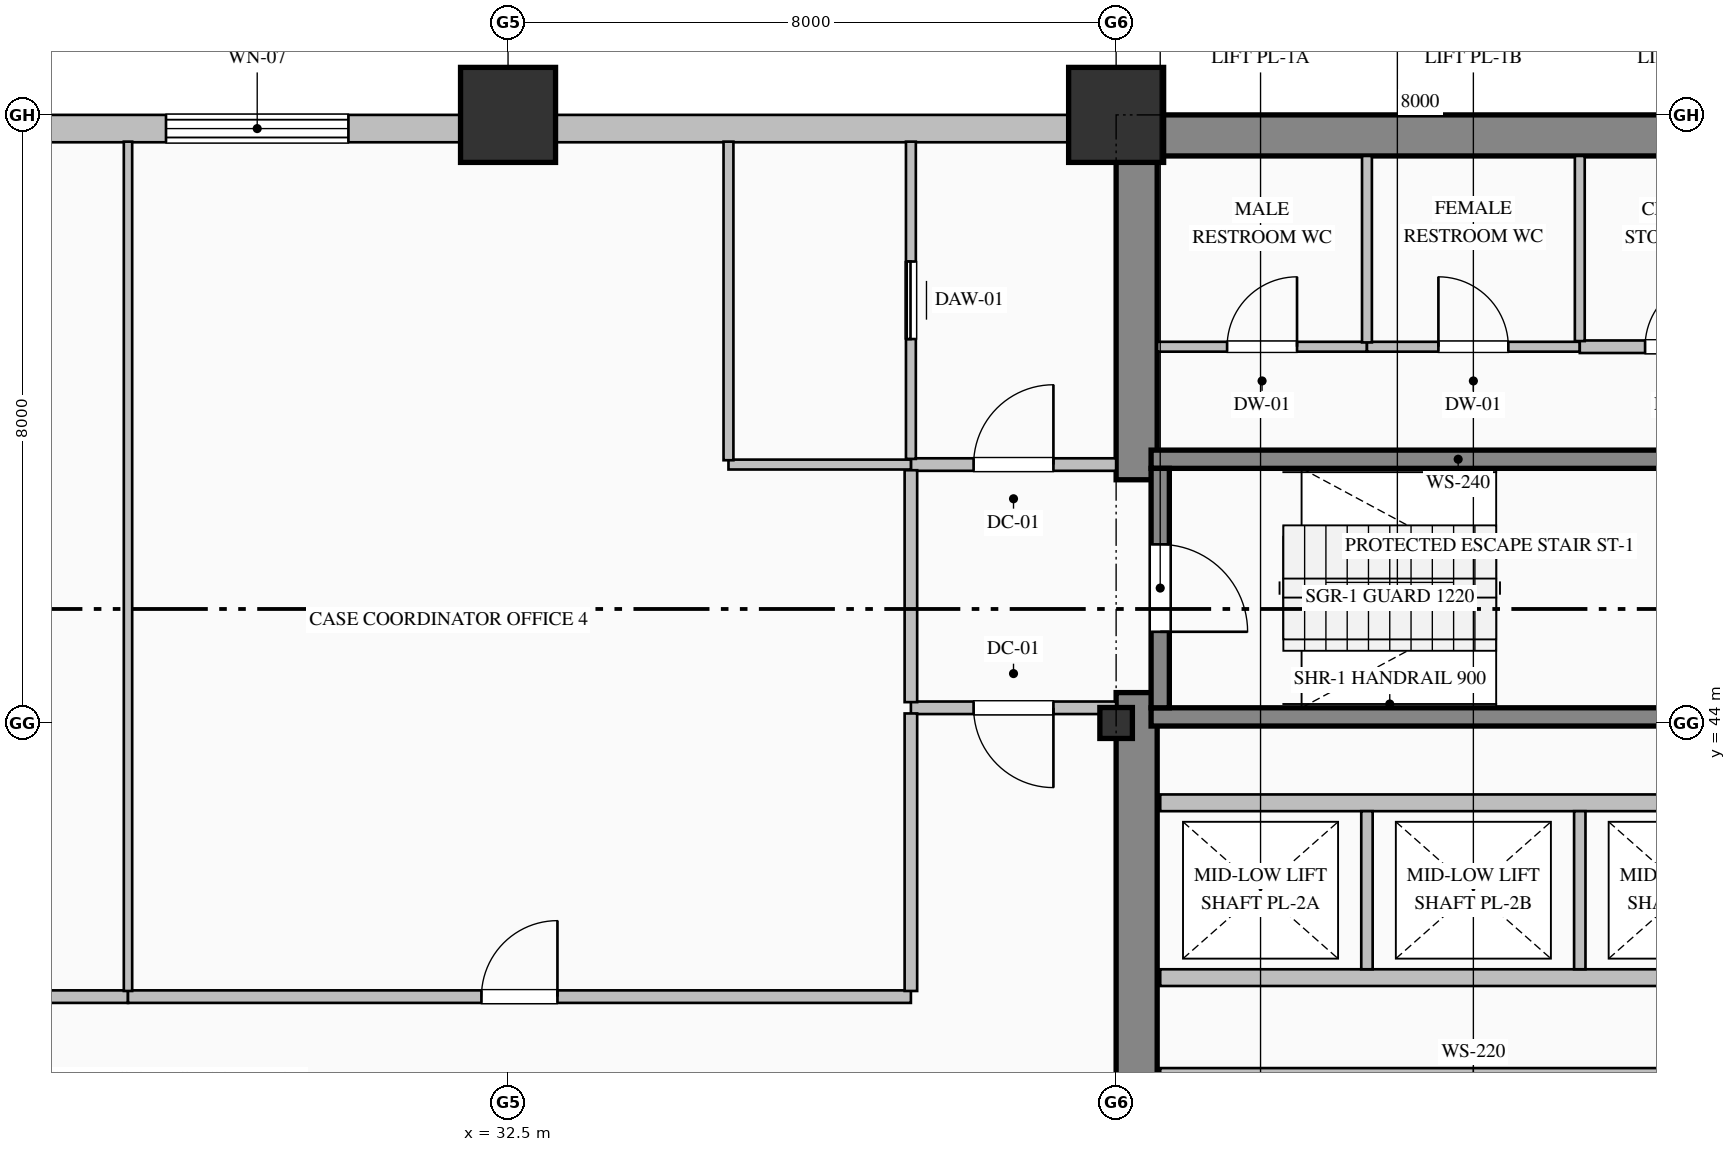
"""IFC4 building model, lengths in metres.
Left out: names, types, materials, properties, quantities, classifications, styles, units other than length and angle.
Written with IfcOpenShell. Run it as: python <this file> out.ifc"""

import sys

from ifc_helpers import new_model, si_unit, direction, frame, frame_2d, origin, origin_2d, place, context, subcontext, project, spatial, rectangle, hollow_rectangle, i_section, extrude, element, fill, save


model = new_model("IFC4")
c1 = context("Model", 3, precision=1e-05, world=origin(), true_north=direction((0.0, 1.0)))
c2 = subcontext(c1, "Body", "Model", "MODEL_VIEW")
j1 = project(units=[si_unit("LENGTHUNIT", "METRE"), si_unit("PLANEANGLEUNIT", "RADIAN")], contexts=[c1])
p1 = place(None, origin())
s1 = spatial("IfcSite", under=j1, at=p1, CompositionType="ELEMENT")
p2 = place(p1, origin())
s2 = spatial("IfcBuilding", under=s1, at=p2, CompositionType="ELEMENT")
p3 = place(p2, frame((0.0, 0.0, 88.2)))
s3 = spatial("IfcBuildingStorey", under=s2, at=p3, CompositionType="ELEMENT", Elevation=88.2)
p4 = place(p3, frame((40.5, 51.73, 0.0), z_axis=(0.0, 0.0, 1.0), x_axis=(1.0, 0.0, 0.0)))
e1 = element("IfcWall", 1, at=p4, inside=s3, PredefinedType="SHEAR", context=c2, shape_type="SweptSolid", body=[
    extrude(rectangle(XDim=23.5, YDim=0.54, at=frame_2d((11.75, 0.0))), origin(), (0.0, 0.0, 1.0), 3.75),
])
p5 = place(p3, frame((40.77, 36.54, 0.0), z_axis=(0.0, 0.0, 1.0), x_axis=(0.0, 1.0, 0.0)))
e2 = element("IfcWall", 2, at=p5, inside=s3, PredefinedType="SHEAR", context=c2, shape_type="SweptSolid", body=[
    extrude(rectangle(XDim=7.86, YDim=0.54, at=frame_2d((3.93, 0.0))), origin(), (0.0, 0.0, 1.0), 3.75),
])
p6 = place(p3, frame((40.77, 47.2, 0.0), z_axis=(0.0, 0.0, 1.0), x_axis=(0.0, 1.0, 0.0)))
e3 = element("IfcWall", 3, at=p6, inside=s3, PredefinedType="SHEAR", context=c2, shape_type="SweptSolid", body=[
    extrude(rectangle(XDim=4.26, YDim=0.54, at=frame_2d((2.13, 0.0))), origin(), (0.0, 0.0, 1.0), 3.75),
])
p7 = place(p3, frame((32.5, 52.0, 0.0), z_axis=(0.0, 0.0, 1.0), x_axis=(1.0, 0.0, 0.0)))
e4 = element("IfcColumn", 4, at=p7, inside=s3, PredefinedType="COLUMN", context=c2, shape_type="SweptSolid", body=[
    extrude(hollow_rectangle(XDim=1.25, YDim=1.25, WallThickness=0.045, at=origin_2d()), origin(), (0.0, 0.0, 1.0), 4.0),
])
p8 = place(p3, frame((40.5, 44.0, 0.0), z_axis=(0.0, 0.0, 1.0), x_axis=(1.0, 0.0, 0.0)))
e5 = element("IfcColumn", 5, at=p8, inside=s3, PredefinedType="COLUMN", context=c2, shape_type="SweptSolid", body=[
    extrude(i_section(OverallWidth=0.407, OverallDepth=0.428, WebThickness=0.02, FlangeThickness=0.035, FilletRadius=0.022, at=origin_2d()), origin(), (0.0, 0.0, 1.0), 4.0),
])
p9 = place(p3, frame((40.5, 52.0, 0.0), z_axis=(0.0, 0.0, 1.0), x_axis=(1.0, 0.0, 0.0)))
e6 = element("IfcColumn", 6, at=p9, inside=s3, PredefinedType="COLUMN", context=c2, shape_type="SweptSolid", body=[
    extrude(hollow_rectangle(XDim=1.25, YDim=1.25, WallThickness=0.045, at=origin_2d()), origin(), (0.0, 0.0, 1.0), 4.0),
])
p10 = place(p3, frame((4.0, 51.82, 0.0), z_axis=(0.0, 0.0, 1.0), x_axis=(1.0, 0.0, 0.0)))
e7 = element("IfcWall", 7, at=p10, inside=s3, PredefinedType="SOLIDWALL", context=c2, shape_type="SweptSolid", body=[
    extrude(rectangle(XDim=36.52, YDim=0.36, at=frame_2d((18.26, 0.0))), origin(), (0.0, 0.0, 1.0), 3.25),
])
p11 = place(p10, frame((6.3, 0.0, 0.85)))
e8 = element("IfcOpeningElement", 8, at=p11, cuts=e7, PredefinedType="OPENING", context=c2, shape_type="SweptSolid", body=[
    extrude(rectangle(XDim=1.8, YDim=2.05, at=frame_2d((0.9, 1.025))), frame((0.0, 0.19, 0.0), z_axis=(0.0, -1.0, 0.0), x_axis=(1.0, 0.0, 0.0)), (0.0, 0.0, 1.0), 0.38),
])
p12 = place(p10, frame((17.1, 0.0, 0.85)))
e9 = element("IfcOpeningElement", 9, at=p12, cuts=e7, PredefinedType="OPENING", context=c2, shape_type="SweptSolid", body=[
    extrude(rectangle(XDim=1.8, YDim=2.05, at=frame_2d((0.9, 1.025))), frame((0.0, 0.19, 0.0), z_axis=(0.0, -1.0, 0.0), x_axis=(1.0, 0.0, 0.0)), (0.0, 0.0, 1.0), 0.38),
])
p13 = place(p10, frame((24.0, 0.0, 0.8)))
e10 = element("IfcOpeningElement", 10, at=p13, cuts=e7, PredefinedType="OPENING", context=c2, shape_type="SweptSolid", body=[
    extrude(rectangle(XDim=2.4, YDim=2.15, at=frame_2d((1.2, 1.075))), frame((0.0, 0.19, 0.0), z_axis=(0.0, -1.0, 0.0), x_axis=(1.0, 0.0, 0.0)), (0.0, 0.0, 1.0), 0.38),
])
for number, where, z_axis, x_axis in (
    (11, (40.96, 47.47, 0.0), (0.0, 0.0, 1.0), (1.0, 0.0, 0.0)),
    (12, (49.04, 44.08, 0.0), (0.0, 0.0, 1.0), (-1.0, 0.0, 0.0)),
):
    element("IfcWall", number, at=place(p3, frame(where, z_axis=z_axis, x_axis=x_axis)), inside=s3, PredefinedType="SOLIDWALL", context=c2, shape_type="SweptSolid", body=[
        extrude(rectangle(XDim=8.08, YDim=0.24, at=frame_2d((4.04, 0.0))), origin(), (0.0, 0.0, 1.0), 4.0),
    ])
p14 = place(p3, frame((41.08, 47.35, 0.0), z_axis=(0.0, 0.0, 1.0), x_axis=(0.0, -1.0, 0.0)))
e13 = element("IfcWall", 13, at=p14, inside=s3, PredefinedType="SOLIDWALL", context=c2, shape_type="SweptSolid", body=[
    extrude(rectangle(XDim=3.15, YDim=0.24, at=frame_2d((1.575, 0.0))), origin(), (0.0, 0.0, 1.0), 4.0),
])
p15 = place(p14, frame((1.0, 0.0, 0.0)))
e14 = element("IfcOpeningElement", 14, at=p15, cuts=e13, PredefinedType="OPENING", context=c2, shape_type="SweptSolid", body=[
    extrude(rectangle(XDim=1.15, YDim=2.2, at=frame_2d((0.575, 1.1))), frame((0.0, 0.13, 0.0), z_axis=(0.0, -1.0, 0.0), x_axis=(1.0, 0.0, 0.0)), (0.0, 0.0, 1.0), 0.26),
])
for number, where, z_axis, x_axis in (
    (15, (41.08, 39.35, 0.0), (0.0, 0.0, 1.0), (1.0, 0.0, 0.0)),
    (16, (49.32, 40.65, 0.0), (0.0, 0.0, 1.0), (-1.0, 0.0, 0.0)),
    (17, (41.08, 42.95, 0.0), (0.0, 0.0, 1.0), (1.0, 0.0, 0.0)),
):
    element("IfcWall", number, at=place(p3, frame(where, z_axis=z_axis, x_axis=x_axis)), inside=s3, PredefinedType="PARTITIONING", context=c2, shape_type="SweptSolid", body=[
        extrude(rectangle(XDim=8.24, YDim=0.22, at=frame_2d((4.12, 0.0))), origin(), (0.0, 0.0, 1.0), 3.75),
    ])
for number, where, z_axis, x_axis in (
    (18, (43.8, 40.76, 0.0), (0.0, 0.0, 1.0), (0.0, 1.0, 0.0)),
    (19, (46.6, 40.76, 0.0), (0.0, 0.0, 1.0), (0.0, 1.0, 0.0)),
):
    element("IfcWall", number, at=place(p3, frame(where, z_axis=z_axis, x_axis=x_axis)), inside=s3, PredefinedType="PARTITIONING", context=c2, shape_type="SweptSolid", body=[
        extrude(rectangle(XDim=2.08, YDim=0.15, at=frame_2d((1.04, 0.0))), origin(), (0.0, 0.0, 1.0), 3.75),
    ])
p16 = place(p3, frame((37.8, 47.4, 0.0), z_axis=(0.0, 0.0, 1.0), x_axis=(1.0, 0.0, 0.0)))
e20 = element("IfcWall", 20, at=p16, inside=s3, PredefinedType="PARTITIONING", context=c2, shape_type="SweptSolid", body=[
    extrude(rectangle(XDim=2.7, YDim=0.165, at=frame_2d((1.35, 0.0))), origin(), (0.0, 0.0, 1.0), 3.75),
])
p17 = place(p16, frame((0.825, 0.0, 0.0)))
e21 = element("IfcOpeningElement", 21, at=p17, cuts=e20, PredefinedType="OPENING", context=c2, shape_type="SweptSolid", body=[
    extrude(rectangle(XDim=1.05, YDim=2.15, at=frame_2d((0.525, 1.075))), frame((0.0, 0.093, 0.0), z_axis=(0.0, -1.0, 0.0), x_axis=(1.0, 0.0, 0.0)), (0.0, 0.0, 1.0), 0.185),
])
p18 = place(p3, frame((40.5, 44.2, 0.0), z_axis=(0.0, 0.0, 1.0), x_axis=(-1.0, 0.0, 0.0)))
e22 = element("IfcWall", 22, at=p18, inside=s3, PredefinedType="PARTITIONING", context=c2, shape_type="SweptSolid", body=[
    extrude(rectangle(XDim=2.7, YDim=0.165, at=frame_2d((1.35, 0.0))), origin(), (0.0, 0.0, 1.0), 3.75),
])
p19 = place(p18, frame((0.825, 0.0, 0.0)))
e23 = element("IfcOpeningElement", 23, at=p19, cuts=e22, PredefinedType="OPENING", context=c2, shape_type="SweptSolid", body=[
    extrude(rectangle(XDim=1.05, YDim=2.15, at=frame_2d((0.525, 1.075))), frame((0.0, 0.093, 0.0), z_axis=(0.0, -1.0, 0.0), x_axis=(1.0, 0.0, 0.0)), (0.0, 0.0, 1.0), 0.185),
])
p20 = place(p3, frame((37.8, 44.274, 0.0), z_axis=(0.0, 0.0, 1.0), x_axis=(0.0, 1.0, 0.0)))
e24 = element("IfcWall", 24, at=p20, inside=s3, PredefinedType="PARTITIONING", context=c2, shape_type="SweptSolid", body=[
    extrude(rectangle(XDim=3.051, YDim=0.165, at=frame_2d((1.525, 0.0))), origin(), (0.0, 0.0, 1.0), 3.75),
])
p21 = place(p3, frame((37.8, 47.475, 0.0), z_axis=(0.0, 0.0, 1.0), x_axis=(0.0, 1.0, 0.0)))
e25 = element("IfcWall", 25, at=p21, inside=s3, PredefinedType="PARTITIONING", context=c2, shape_type="SweptSolid", body=[
    extrude(rectangle(XDim=4.173, YDim=0.13, at=frame_2d((2.087, 0.0))), origin(), (0.0, 0.0, 1.0), 3.75),
])
p22 = place(p21, frame((1.577, 0.0, 0.0)))
e26 = element("IfcOpeningElement", 26, at=p22, cuts=e25, PredefinedType="OPENING", context=c2, shape_type="SweptSolid", body=[
    extrude(rectangle(XDim=1.02, YDim=2.15, at=frame_2d((0.51, 1.075))), frame((0.0, 0.075, 0.0), z_axis=(0.0, -1.0, 0.0), x_axis=(1.0, 0.0, 0.0)), (0.0, 0.0, 1.0), 0.15),
])
p23 = place(p3, frame((37.8, 47.4, 0.0), z_axis=(0.0, 0.0, 1.0), x_axis=(-1.0, 0.0, 0.0)))
e27 = element("IfcWall", 27, at=p23, inside=s3, PredefinedType="PARTITIONING", context=c2, shape_type="SweptSolid", body=[
    extrude(rectangle(XDim=2.4, YDim=0.13, at=frame_2d((1.2, 0.0))), origin(), (0.0, 0.0, 1.0), 3.75),
])
p24 = place(p3, frame((35.4, 47.457, 0.0), z_axis=(0.0, 0.0, 1.0), x_axis=(0.0, 1.0, 0.0)))
e28 = element("IfcWall", 28, at=p24, inside=s3, PredefinedType="PARTITIONING", context=c2, shape_type="SweptSolid", body=[
    extrude(rectangle(XDim=4.191, YDim=0.13, at=frame_2d((2.095, 0.0))), origin(), (0.0, 0.0, 1.0), 3.75),
])
p25 = place(p3, frame((41.04, 48.95, 0.0), z_axis=(0.0, 0.0, 1.0), x_axis=(1.0, 0.0, 0.0)))
e29 = element("IfcWall", 29, at=p25, inside=s3, PredefinedType="PARTITIONING", context=c2, shape_type="SweptSolid", body=[
    extrude(rectangle(XDim=2.76, YDim=0.13, at=frame_2d((1.38, 0.0))), origin(), (0.0, 0.0, 1.0), 3.75),
])
p26 = place(p25, frame((0.92, 0.0, 0.0)))
e30 = element("IfcOpeningElement", 30, at=p26, cuts=e29, PredefinedType="OPENING", context=c2, shape_type="SweptSolid", body=[
    extrude(rectangle(XDim=0.92, YDim=2.15, at=frame_2d((0.46, 1.075))), frame((0.0, 0.075, 0.0), z_axis=(0.0, -1.0, 0.0), x_axis=(1.0, 0.0, 0.0)), (0.0, 0.0, 1.0), 0.15),
])
p27 = place(p3, frame((43.8, 48.95, 0.0), z_axis=(0.0, 0.0, 1.0), x_axis=(1.0, 0.0, 0.0)))
e31 = element("IfcWall", 31, at=p27, inside=s3, PredefinedType="PARTITIONING", context=c2, shape_type="SweptSolid", body=[
    extrude(rectangle(XDim=2.8, YDim=0.13, at=frame_2d((1.4, 0.0))), origin(), (0.0, 0.0, 1.0), 3.75),
])
p28 = place(p27, frame((0.94, 0.0, 0.0)))
e32 = element("IfcOpeningElement", 32, at=p28, cuts=e31, PredefinedType="OPENING", context=c2, shape_type="SweptSolid", body=[
    extrude(rectangle(XDim=0.92, YDim=2.15, at=frame_2d((0.46, 1.075))), frame((0.0, 0.075, 0.0), z_axis=(0.0, -1.0, 0.0), x_axis=(1.0, 0.0, 0.0)), (0.0, 0.0, 1.0), 0.15),
])
p29 = place(p3, frame((46.6, 48.95, 0.0), z_axis=(0.0, 0.0, 1.0), x_axis=(1.0, 0.0, 0.0)))
e33 = element("IfcWall", 33, at=p29, inside=s3, PredefinedType="PARTITIONING", context=c2, shape_type="SweptSolid", body=[
    extrude(rectangle(XDim=2.618, YDim=0.165, at=frame_2d((1.309, 0.0))), origin(), (0.0, 0.0, 1.0), 3.75),
])
p30 = place(p29, frame((0.859, 0.0, 0.0)))
e34 = element("IfcOpeningElement", 34, at=p30, cuts=e33, PredefinedType="OPENING", context=c2, shape_type="SweptSolid", body=[
    extrude(rectangle(XDim=0.9, YDim=2.15, at=frame_2d((0.45, 1.075))), frame((0.0, 0.093, 0.0), z_axis=(0.0, -1.0, 0.0), x_axis=(1.0, 0.0, 0.0)), (0.0, 0.0, 1.0), 0.185),
])
p31 = place(p3, frame((43.8, 51.46, 0.0), z_axis=(0.0, 0.0, 1.0), x_axis=(0.0, -1.0, 0.0)))
e35 = element("IfcWall", 35, at=p31, inside=s3, PredefinedType="PARTITIONING", context=c2, shape_type="SweptSolid", body=[
    extrude(rectangle(XDim=2.453, YDim=0.13, at=frame_2d((1.227, 0.0))), origin(), (0.0, 0.0, 1.0), 3.75),
])
p32 = place(p3, frame((46.6, 51.46, 0.0), z_axis=(0.0, 0.0, 1.0), x_axis=(0.0, -1.0, 0.0)))
e36 = element("IfcWall", 36, at=p32, inside=s3, PredefinedType="PARTITIONING", context=c2, shape_type="SweptSolid", body=[
    extrude(rectangle(XDim=2.436, YDim=0.13, at=frame_2d((1.218, 0.0))), origin(), (0.0, 0.0, 1.0), 3.75),
])
p33 = place(p3, frame((20.5, 40.4, 0.0), z_axis=(0.0, 0.0, 1.0), x_axis=(1.0, 0.0, 0.0)))
e37 = element("IfcWall", 37, at=p33, inside=s3, PredefinedType="PARTITIONING", context=c2, shape_type="SweptSolid", body=[
    extrude(rectangle(XDim=7.0, YDim=0.165, at=frame_2d((3.5, 0.0))), origin(), (0.0, 0.0, 1.0), 3.75),
])
p34 = place(p33, frame((3.0, 0.0, 0.0)))
e38 = element("IfcOpeningElement", 38, at=p34, cuts=e37, PredefinedType="OPENING", context=c2, shape_type="SweptSolid", body=[
    extrude(rectangle(XDim=1.0, YDim=2.15, at=frame_2d((0.5, 1.075))), frame((0.0, 0.093, 0.0), z_axis=(0.0, -1.0, 0.0), x_axis=(1.0, 0.0, 0.0)), (0.0, 0.0, 1.0), 0.185),
])
p35 = place(p3, frame((27.5, 40.4, 0.0), z_axis=(0.0, 0.0, 1.0), x_axis=(1.0, 0.0, 0.0)))
e39 = element("IfcWall", 39, at=p35, inside=s3, PredefinedType="PARTITIONING", context=c2, shape_type="SweptSolid", body=[
    extrude(rectangle(XDim=10.3, YDim=0.165, at=frame_2d((5.15, 0.0))), origin(), (0.0, 0.0, 1.0), 3.75),
])
p36 = place(p35, frame((4.65, 0.0, 0.0)))
e40 = element("IfcOpeningElement", 40, at=p36, cuts=e39, PredefinedType="OPENING", context=c2, shape_type="SweptSolid", body=[
    extrude(rectangle(XDim=1.0, YDim=2.15, at=frame_2d((0.5, 1.075))), frame((0.0, 0.093, 0.0), z_axis=(0.0, -1.0, 0.0), x_axis=(1.0, 0.0, 0.0)), (0.0, 0.0, 1.0), 0.185),
])
p37 = place(p3, frame((37.8, 40.475, 0.0), z_axis=(0.0, 0.0, 1.0), x_axis=(0.0, 1.0, 0.0)))
e41 = element("IfcWall", 41, at=p37, inside=s3, PredefinedType="PARTITIONING", context=c2, shape_type="SweptSolid", body=[
    extrude(rectangle(XDim=3.651, YDim=0.165, at=frame_2d((1.825, 0.0))), origin(), (0.0, 0.0, 1.0), 3.75),
])
p38 = place(p3, frame((27.5, 51.648, 0.0), z_axis=(0.0, 0.0, 1.0), x_axis=(0.0, -1.0, 0.0)))
e42 = element("IfcWall", 42, at=p38, inside=s3, PredefinedType="MOVABLE", context=c2, shape_type="SweptSolid", body=[
    extrude(rectangle(XDim=11.173, YDim=0.11, at=frame_2d((5.587, 0.0))), origin(), (0.0, 0.0, 1.0), 3.75),
])
p39 = place(p13, origin())
e43 = element("IfcWindow", 43, at=p39, inside=s3, PartitioningType="TRIPLE_PANEL_VERTICAL", PredefinedType="WINDOW", context=c2, shape_type="SweptSolid", body=[
    extrude(rectangle(XDim=2.4, YDim=2.15, at=frame_2d((1.2, 1.075))), frame((0.0, 0.15, 0.0), z_axis=(0.0, -1.0, 0.0), x_axis=(1.0, 0.0, 0.0)), (0.0, 0.0, 1.0), 0.06),
])
fill(e10, e43)
p40 = place(p15, origin())
e44 = element("IfcDoor", 44, at=p40, inside=s3, OperationType="SINGLE_SWING_RIGHT", PredefinedType="DOOR", context=c2, shape_type="SweptSolid", body=[
    extrude(rectangle(XDim=1.15, YDim=2.2, at=frame_2d((0.575, 1.1))), frame((0.0, 0.025, 0.0), z_axis=(0.0, -1.0, 0.0), x_axis=(1.0, 0.0, 0.0)), (0.0, 0.0, 1.0), 0.05),
])
fill(e14, e44)
p41 = place(p17, origin())
e45 = element("IfcDoor", 45, at=p41, inside=s3, OperationType="SINGLE_SWING_RIGHT", PredefinedType="DOOR", context=c2, shape_type="SweptSolid", body=[
    extrude(rectangle(XDim=1.05, YDim=2.15, at=frame_2d((0.525, 1.075))), frame((0.0, 0.025, 0.0), z_axis=(0.0, -1.0, 0.0), x_axis=(1.0, 0.0, 0.0)), (0.0, 0.0, 1.0), 0.05),
])
fill(e21, e45)
p42 = place(p19, origin())
e46 = element("IfcDoor", 46, at=p42, inside=s3, OperationType="SINGLE_SWING_LEFT", PredefinedType="DOOR", context=c2, shape_type="SweptSolid", body=[
    extrude(rectangle(XDim=1.05, YDim=2.15, at=frame_2d((0.525, 1.075))), frame((0.0, 0.025, 0.0), z_axis=(0.0, -1.0, 0.0), x_axis=(1.0, 0.0, 0.0)), (0.0, 0.0, 1.0), 0.05),
])
fill(e23, e46)
p43 = place(p22, origin())
e47 = element("IfcDoor", 47, at=p43, inside=s3, OperationType="SLIDING_TO_LEFT", PredefinedType="DOOR", context=c2, shape_type="SweptSolid", body=[
    extrude(rectangle(XDim=1.02, YDim=2.15, at=frame_2d((0.51, 1.075))), frame((0.0, 0.025, 0.0), z_axis=(0.0, -1.0, 0.0), x_axis=(1.0, 0.0, 0.0)), (0.0, 0.0, 1.0), 0.05),
])
fill(e26, e47)
p44 = place(p26, origin())
e48 = element("IfcDoor", 48, at=p44, inside=s3, OperationType="SINGLE_SWING_RIGHT", PredefinedType="DOOR", context=c2, shape_type="SweptSolid", body=[
    extrude(rectangle(XDim=0.92, YDim=2.15, at=frame_2d((0.46, 1.075))), frame((0.0, 0.025, 0.0), z_axis=(0.0, -1.0, 0.0), x_axis=(1.0, 0.0, 0.0)), (0.0, 0.0, 1.0), 0.05),
])
fill(e30, e48)
p45 = place(p28, origin())
e49 = element("IfcDoor", 49, at=p45, inside=s3, OperationType="SINGLE_SWING_LEFT", PredefinedType="DOOR", context=c2, shape_type="SweptSolid", body=[
    extrude(rectangle(XDim=0.92, YDim=2.15, at=frame_2d((0.46, 1.075))), frame((0.0, 0.025, 0.0), z_axis=(0.0, -1.0, 0.0), x_axis=(1.0, 0.0, 0.0)), (0.0, 0.0, 1.0), 0.05),
])
fill(e32, e49)
p46 = place(p30, origin())
e50 = element("IfcDoor", 50, at=p46, inside=s3, OperationType="SINGLE_SWING_RIGHT", PredefinedType="DOOR", context=c2, shape_type="SweptSolid", body=[
    extrude(rectangle(XDim=0.9, YDim=2.15, at=frame_2d((0.45, 1.075))), frame((0.0, 0.025, 0.0), z_axis=(0.0, -1.0, 0.0), x_axis=(1.0, 0.0, 0.0)), (0.0, 0.0, 1.0), 0.05),
])
fill(e34, e50)
p47 = place(p36, origin())
e51 = element("IfcDoor", 51, at=p47, inside=s3, OperationType="SINGLE_SWING_RIGHT", PredefinedType="DOOR", context=c2, shape_type="SweptSolid", body=[
    extrude(rectangle(XDim=1.0, YDim=2.15, at=frame_2d((0.5, 1.075))), frame((0.0, 0.025, 0.0), z_axis=(0.0, -1.0, 0.0), x_axis=(1.0, 0.0, 0.0)), (0.0, 0.0, 1.0), 0.05),
])
fill(e40, e51)
save(model, sys.argv[1])
